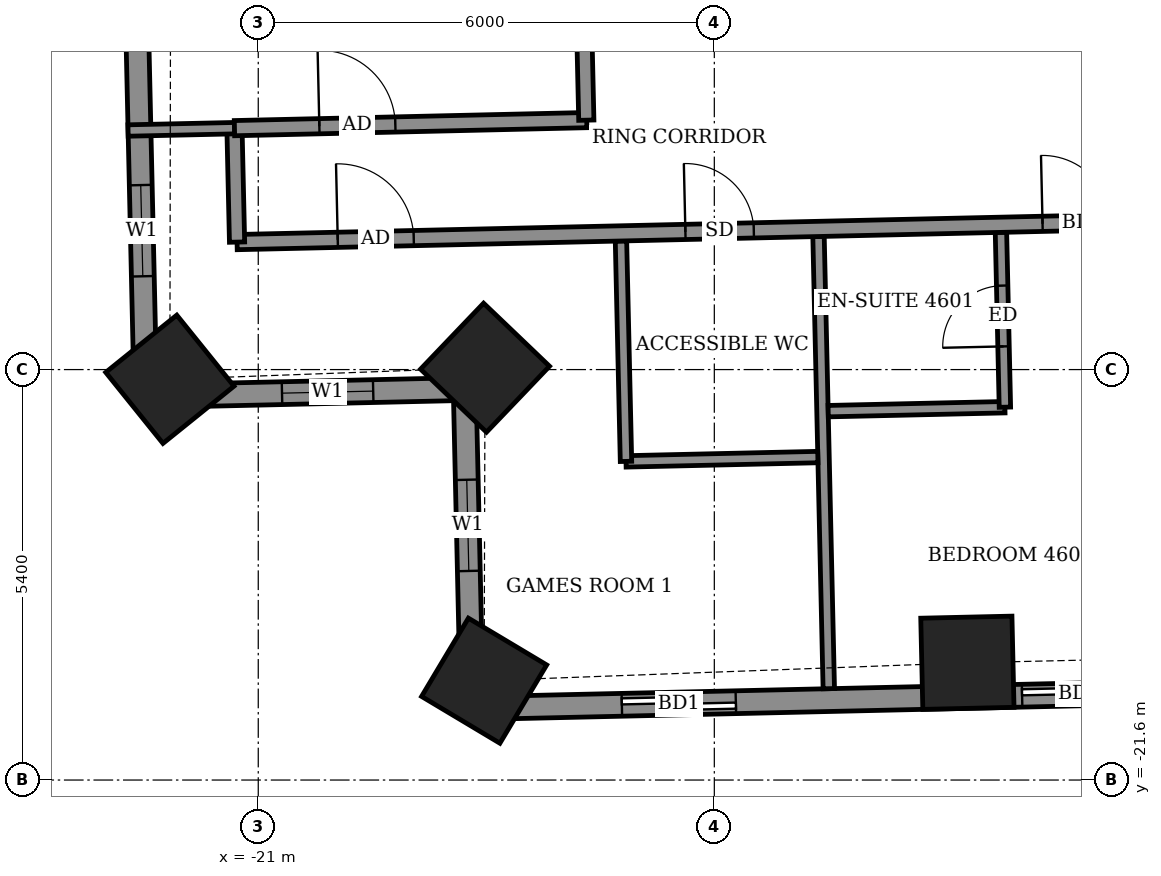
"""IFC4 building model, lengths in metres.
Left out: names, types, materials, properties, quantities, classifications, styles, units other than length and angle.
Written with IfcOpenShell. Run it as: python <this file> out.ifc"""

import sys

from ifc_helpers import new_model, si_unit, direction, frame, frame_2d, origin, origin_2d, place, context, subcontext, project, spatial, rectangle, extrude, element, fill, save


model = new_model("IFC4")
c1 = context("Model", 3, precision=1e-05, world=origin(), true_north=direction((0.0, 1.0)))
c2 = subcontext(c1, "Body", "Model", "MODEL_VIEW")
j1 = project(units=[si_unit("LENGTHUNIT", "METRE"), si_unit("PLANEANGLEUNIT", "RADIAN")], contexts=[c1])
p1 = place(None, origin())
s1 = spatial("IfcSite", under=j1, at=p1, CompositionType="ELEMENT")
p2 = place(p1, origin())
s2 = spatial("IfcBuilding", under=s1, at=p2, CompositionType="ELEMENT")
p3 = place(p2, frame((0.0, 0.0, 182.5)))
s3 = spatial("IfcBuildingStorey", under=s2, at=p3, CompositionType="ELEMENT", Elevation=182.5)
for number, where, z_axis, x_axis in (
    (1, (-22.163, -16.328, -0.55), (0.0, 0.0, 1.0), (0.627, -0.779, 0.0)),
    (2, (-18.016, -16.175, -0.55), (0.0, 0.0, 1.0), (0.723, -0.691, 0.0)),
    (3, (-18.028, -20.293, -0.55), (0.0, 0.0, 1.0), (0.858, -0.513, 0.0)),
    (4, (-11.671, -20.057, -0.55), (0.0, 0.0, 1.0), (1.0, 0.023, 0.0)),
):
    element("IfcColumn", number, at=place(p3, frame(where, z_axis=z_axis, x_axis=x_axis)), inside=s3, PredefinedType="COLUMN", context=c2, shape_type="SweptSolid", body=[
        extrude(rectangle(XDim=1.2, YDim=1.2, at=origin_2d()), origin(), (0.0, 0.0, 1.0), 3.6),
    ])
p4 = place(p3, frame((-22.729, -5.725, 0.0), z_axis=(0.0, 0.0, 1.0), x_axis=(0.022726014582, -0.999741730779, 0.0)))
e5 = element("IfcWall", 5, at=p4, inside=s3, PredefinedType="SOLIDWALL", context=c2, shape_type="SweptSolid", body=[
    extrude(rectangle(XDim=10.829, YDim=0.3, at=frame_2d((5.414, 0.0))), origin(), (0.0, 0.0, 1.0), 3.05),
])
p5 = place(p4, frame((1.142, 0.0, 0.0)))
e6 = element("IfcOpeningElement", 6, at=p5, cuts=e5, PredefinedType="OPENING", context=c2, shape_type="SweptSolid", body=[
    extrude(rectangle(XDim=1.5, YDim=2.4, at=frame_2d((0.75, 1.2))), frame((0.0, 0.16, 0.0), z_axis=(0.0, -1.0, 0.0), x_axis=(1.0, 0.0, 0.0)), (0.0, 0.0, 1.0), 0.32),
])
p6 = place(p4, frame((3.798, 0.0, 0.9)))
e7 = element("IfcOpeningElement", 7, at=p6, cuts=e5, PredefinedType="OPENING", context=c2, shape_type="SweptSolid", body=[
    extrude(rectangle(XDim=0.9, YDim=1.5, at=frame_2d((0.45, 0.75))), frame((0.0, 0.16, 0.0), z_axis=(0.0, -1.0, 0.0), x_axis=(1.0, 0.0, 0.0)), (0.0, 0.0, 1.0), 0.32),
])
p7 = place(p4, frame((8.05, 0.0, 0.9)))
e8 = element("IfcOpeningElement", 8, at=p7, cuts=e5, PredefinedType="OPENING", context=c2, shape_type="SweptSolid", body=[
    extrude(rectangle(XDim=1.2, YDim=1.5, at=frame_2d((0.6, 0.75))), frame((0.0, 0.16, 0.0), z_axis=(0.0, -1.0, 0.0), x_axis=(1.0, 0.0, 0.0)), (0.0, 0.0, 1.0), 0.32),
])
p8 = place(p3, frame((-22.483, -16.551, 0.0), z_axis=(0.0, 0.0, 1.0), x_axis=(0.999744320311, 0.022611811187, 0.0)))
e9 = element("IfcWall", 9, at=p8, inside=s3, PredefinedType="SOLIDWALL", context=c2, shape_type="SweptSolid", body=[
    extrude(rectangle(XDim=4.2, YDim=0.3, at=frame_2d((2.1, 0.0))), origin(), (0.0, 0.0, 1.0), 2.55),
])
p9 = place(p8, frame((1.796, 0.0, 0.9)))
e10 = element("IfcOpeningElement", 10, at=p9, cuts=e9, PredefinedType="OPENING", context=c2, shape_type="SweptSolid", body=[
    extrude(rectangle(XDim=1.2, YDim=1.5, at=frame_2d((0.6, 0.75))), frame((0.0, 0.16, 0.0), z_axis=(0.0, -1.0, 0.0), x_axis=(1.0, 0.0, 0.0)), (0.0, 0.0, 1.0), 0.32),
])
p10 = place(p3, frame((-18.284, -16.456, 0.0), z_axis=(0.0, 0.0, 1.0), x_axis=(0.022611811187, -0.999744320311, 0.0)))
e11 = element("IfcWall", 11, at=p10, inside=s3, PredefinedType="SOLIDWALL", context=c2, shape_type="SweptSolid", body=[
    extrude(rectangle(XDim=4.2, YDim=0.3, at=frame_2d((2.1, 0.0))), origin(), (0.0, 0.0, 1.0), 2.55),
])
p11 = place(p10, frame((1.194, 0.0, 0.9)))
e12 = element("IfcOpeningElement", 12, at=p11, cuts=e11, PredefinedType="OPENING", context=c2, shape_type="SweptSolid", body=[
    extrude(rectangle(XDim=1.2, YDim=1.5, at=frame_2d((0.6, 0.75))), frame((0.0, 0.16, 0.0), z_axis=(0.0, -1.0, 0.0), x_axis=(1.0, 0.0, 0.0)), (0.0, 0.0, 1.0), 0.32),
])
p12 = place(p3, frame((-18.189, -20.655, 0.0), z_axis=(0.0, 0.0, 1.0), x_axis=(0.999742285265, 0.022701609063, 0.0)))
e13 = element("IfcWall", 13, at=p12, inside=s3, PredefinedType="SOLIDWALL", context=c2, shape_type="SweptSolid", body=[
    extrude(rectangle(XDim=39.78, YDim=0.3, at=frame_2d((19.89, 0.0))), origin(), (0.0, 0.0, 1.0), 3.05),
])
p13 = place(p12, frame((1.973, 0.0, 0.0)))
e14 = element("IfcOpeningElement", 14, at=p13, cuts=e13, PredefinedType="OPENING", context=c2, shape_type="SweptSolid", body=[
    extrude(rectangle(XDim=1.5, YDim=2.4, at=frame_2d((0.75, 1.2))), frame((0.0, 0.16, 0.0), z_axis=(0.0, -1.0, 0.0), x_axis=(1.0, 0.0, 0.0)), (0.0, 0.0, 1.0), 0.32),
])
p14 = place(p12, frame((7.24, 0.0, 0.0)))
e15 = element("IfcOpeningElement", 15, at=p14, cuts=e13, PredefinedType="OPENING", context=c2, shape_type="SweptSolid", body=[
    extrude(rectangle(XDim=1.5, YDim=2.4, at=frame_2d((0.75, 1.2))), frame((0.0, 0.16, 0.0), z_axis=(0.0, -1.0, 0.0), x_axis=(1.0, 0.0, 0.0)), (0.0, 0.0, 1.0), 0.32),
])
p15 = place(p12, frame((10.23, 0.0, 0.0)))
e16 = element("IfcOpeningElement", 16, at=p15, cuts=e13, PredefinedType="OPENING", context=c2, shape_type="SweptSolid", body=[
    extrude(rectangle(XDim=1.5, YDim=2.4, at=frame_2d((0.75, 1.2))), frame((0.0, 0.16, 0.0), z_axis=(0.0, -1.0, 0.0), x_axis=(1.0, 0.0, 0.0)), (0.0, 0.0, 1.0), 0.32),
])
p16 = place(p12, frame((14.83, 0.0, 0.0)))
e17 = element("IfcOpeningElement", 17, at=p16, cuts=e13, PredefinedType="OPENING", context=c2, shape_type="SweptSolid", body=[
    extrude(rectangle(XDim=1.5, YDim=2.4, at=frame_2d((0.75, 1.2))), frame((0.0, 0.16, 0.0), z_axis=(0.0, -1.0, 0.0), x_axis=(1.0, 0.0, 0.0)), (0.0, 0.0, 1.0), 0.32),
])
p17 = place(p12, frame((17.97, 0.0, 0.0)))
e18 = element("IfcOpeningElement", 18, at=p17, cuts=e13, PredefinedType="OPENING", context=c2, shape_type="SweptSolid", body=[
    extrude(rectangle(XDim=1.2, YDim=2.4, at=frame_2d((0.6, 1.2))), frame((0.0, 0.16, 0.0), z_axis=(0.0, -1.0, 0.0), x_axis=(1.0, 0.0, 0.0)), (0.0, 0.0, 1.0), 0.32),
])
p18 = place(p12, frame((23.275, 0.0, 0.0)))
e19 = element("IfcOpeningElement", 19, at=p18, cuts=e13, PredefinedType="OPENING", context=c2, shape_type="SweptSolid", body=[
    extrude(rectangle(XDim=1.5, YDim=2.4, at=frame_2d((0.75, 1.2))), frame((0.0, 0.16, 0.0), z_axis=(0.0, -1.0, 0.0), x_axis=(1.0, 0.0, 0.0)), (0.0, 0.0, 1.0), 0.32),
])
p19 = place(p12, frame((27.935, 0.0, 0.0)))
e20 = element("IfcOpeningElement", 20, at=p19, cuts=e13, PredefinedType="OPENING", context=c2, shape_type="SweptSolid", body=[
    extrude(rectangle(XDim=1.5, YDim=2.4, at=frame_2d((0.75, 1.2))), frame((0.0, 0.16, 0.0), z_axis=(0.0, -1.0, 0.0), x_axis=(1.0, 0.0, 0.0)), (0.0, 0.0, 1.0), 0.32),
])
p20 = place(p12, frame((30.925, 0.0, 0.0)))
e21 = element("IfcOpeningElement", 21, at=p20, cuts=e13, PredefinedType="OPENING", context=c2, shape_type="SweptSolid", body=[
    extrude(rectangle(XDim=1.5, YDim=2.4, at=frame_2d((0.75, 1.2))), frame((0.0, 0.16, 0.0), z_axis=(0.0, -1.0, 0.0), x_axis=(1.0, 0.0, 0.0)), (0.0, 0.0, 1.0), 0.32),
])
p21 = place(p12, frame((35.665, 0.0, 0.9)))
e22 = element("IfcOpeningElement", 22, at=p21, cuts=e13, PredefinedType="OPENING", context=c2, shape_type="SweptSolid", body=[
    extrude(rectangle(XDim=2.4, YDim=1.5, at=frame_2d((1.2, 0.75))), frame((0.0, 0.16, 0.0), z_axis=(0.0, -1.0, 0.0), x_axis=(1.0, 0.0, 0.0)), (0.0, 0.0, 1.0), 0.32),
])
p22 = place(p3, frame((-13.494, -20.398, 0.0), z_axis=(0.0, 0.0, 1.0), x_axis=(-0.022692509051, 0.999742491861, 0.0)))
e23 = element("IfcWall", 23, at=p22, inside=s3, PredefinedType="PARTITIONING", context=c2, shape_type="SweptSolid", body=[
    extrude(rectangle(XDim=5.949, YDim=0.15, at=frame_2d((2.975, 0.0))), origin(), (0.0, 0.0, 1.0), 2.55),
])
p23 = place(p3, frame((-16.162, -17.408, 0.0), z_axis=(0.0, 0.0, 1.0), x_axis=(0.999746160391, 0.022530308093, 0.0)))
e24 = element("IfcWall", 24, at=p23, inside=s3, PredefinedType="PARTITIONING", context=c2, shape_type="SweptSolid", body=[
    extrude(rectangle(XDim=2.525, YDim=0.15, at=frame_2d((1.262, 0.0))), origin(), (0.0, 0.0, 1.0), 3.05),
])
p24 = place(p3, frame((-16.162, -17.408, 0.0), z_axis=(0.0, 0.0, 1.0), x_axis=(-0.022732880677, 0.999741574676, 0.0)))
e25 = element("IfcWall", 25, at=p24, inside=s3, PredefinedType="PARTITIONING", context=c2, shape_type="SweptSolid", body=[
    extrude(rectangle(XDim=2.9, YDim=0.15, at=frame_2d((1.45, 0.0))), origin(), (0.0, 0.0, 1.0), 3.05),
])
p25 = place(p3, frame((-13.502, -16.747, 0.0), z_axis=(0.0, 0.0, 1.0), x_axis=(0.999749954681, 0.022361308448, 0.0)))
e26 = element("IfcWall", 26, at=p25, inside=s3, PredefinedType="PARTITIONING", context=c2, shape_type="SweptSolid", body=[
    extrude(rectangle(XDim=2.325, YDim=0.15, at=frame_2d((1.163, 0.0))), origin(), (0.0, 0.0, 1.0), 3.05),
])
p26 = place(p3, frame((-11.177, -16.695, 0.0), z_axis=(0.0, 0.0, 1.0), x_axis=(-0.022603288534, 0.999744513037, 0.0)))
e27 = element("IfcWall", 27, at=p26, inside=s3, PredefinedType="PARTITIONING", context=c2, shape_type="SweptSolid", body=[
    extrude(rectangle(XDim=2.301, YDim=0.15, at=frame_2d((1.15, 0.0))), origin(), (0.0, 0.0, 1.0), 3.05),
])
p27 = place(p26, frame((0.8, 0.0, 0.0)))
e28 = element("IfcOpeningElement", 28, at=p27, cuts=e27, PredefinedType="OPENING", context=c2, shape_type="SweptSolid", body=[
    extrude(rectangle(XDim=0.8, YDim=2.1, at=frame_2d((0.4, 1.05))), frame((0.0, 0.085, 0.0), z_axis=(0.0, -1.0, 0.0), x_axis=(1.0, 0.0, 0.0)), (0.0, 0.0, 1.0), 0.17),
])
p28 = place(p3, frame((-21.279, -14.523, 0.0), z_axis=(0.0, 0.0, 1.0), x_axis=(0.999742878501, 0.022675468818, 0.0)))
e29 = element("IfcWall", 29, at=p28, inside=s3, PredefinedType="PARTITIONING", context=c2, shape_type="SweptSolid", body=[
    extrude(rectangle(XDim=46.48, YDim=0.2, at=frame_2d((23.24, 0.0))), origin(), (0.0, 0.0, 1.0), 3.05),
])
p29 = place(p28, frame((1.325, 0.0, 0.0)))
e30 = element("IfcOpeningElement", 30, at=p29, cuts=e29, PredefinedType="OPENING", context=c2, shape_type="SweptSolid", body=[
    extrude(rectangle(XDim=1.0, YDim=2.1, at=frame_2d((0.5, 1.05))), frame((0.0, 0.11, 0.0), z_axis=(0.0, -1.0, 0.0), x_axis=(1.0, 0.0, 0.0)), (0.0, 0.0, 1.0), 0.22),
])
p30 = place(p28, frame((5.9, 0.0, 0.0)))
e31 = element("IfcOpeningElement", 31, at=p30, cuts=e29, PredefinedType="OPENING", context=c2, shape_type="SweptSolid", body=[
    extrude(rectangle(XDim=0.9, YDim=2.1, at=frame_2d((0.45, 1.05))), frame((0.0, 0.11, 0.0), z_axis=(0.0, -1.0, 0.0), x_axis=(1.0, 0.0, 0.0)), (0.0, 0.0, 1.0), 0.22),
])
p31 = place(p28, frame((10.6, 0.0, 0.0)))
e32 = element("IfcOpeningElement", 32, at=p31, cuts=e29, PredefinedType="OPENING", context=c2, shape_type="SweptSolid", body=[
    extrude(rectangle(XDim=0.9, YDim=2.1, at=frame_2d((0.45, 1.05))), frame((0.0, 0.11, 0.0), z_axis=(0.0, -1.0, 0.0), x_axis=(1.0, 0.0, 0.0)), (0.0, 0.0, 1.0), 0.22),
])
p32 = place(p28, frame((12.525, 0.0, 0.0)))
e33 = element("IfcOpeningElement", 33, at=p32, cuts=e29, PredefinedType="OPENING", context=c2, shape_type="SweptSolid", body=[
    extrude(rectangle(XDim=0.9, YDim=2.1, at=frame_2d((0.45, 1.05))), frame((0.0, 0.11, 0.0), z_axis=(0.0, -1.0, 0.0), x_axis=(1.0, 0.0, 0.0)), (0.0, 0.0, 1.0), 0.22),
])
p33 = place(p28, frame((19.175, 0.0, 0.0)))
e34 = element("IfcOpeningElement", 34, at=p33, cuts=e29, PredefinedType="OPENING", context=c2, shape_type="SweptSolid", body=[
    extrude(rectangle(XDim=0.9, YDim=2.1, at=frame_2d((0.45, 1.05))), frame((0.0, 0.11, 0.0), z_axis=(0.0, -1.0, 0.0), x_axis=(1.0, 0.0, 0.0)), (0.0, 0.0, 1.0), 0.22),
])
p34 = place(p28, frame((21.05, 0.0, 0.0)))
e35 = element("IfcOpeningElement", 35, at=p34, cuts=e29, PredefinedType="OPENING", context=c2, shape_type="SweptSolid", body=[
    extrude(rectangle(XDim=0.9, YDim=2.1, at=frame_2d((0.45, 1.05))), frame((0.0, 0.11, 0.0), z_axis=(0.0, -1.0, 0.0), x_axis=(1.0, 0.0, 0.0)), (0.0, 0.0, 1.0), 0.22),
])
p35 = place(p28, frame((27.725, 0.0, 0.0)))
e36 = element("IfcOpeningElement", 36, at=p35, cuts=e29, PredefinedType="OPENING", context=c2, shape_type="SweptSolid", body=[
    extrude(rectangle(XDim=0.9, YDim=2.1, at=frame_2d((0.45, 1.05))), frame((0.0, 0.11, 0.0), z_axis=(0.0, -1.0, 0.0), x_axis=(1.0, 0.0, 0.0)), (0.0, 0.0, 1.0), 0.22),
])
p36 = place(p28, frame((29.6, 0.0, 0.0)))
e37 = element("IfcOpeningElement", 37, at=p36, cuts=e29, PredefinedType="OPENING", context=c2, shape_type="SweptSolid", body=[
    extrude(rectangle(XDim=0.9, YDim=2.1, at=frame_2d((0.45, 1.05))), frame((0.0, 0.11, 0.0), z_axis=(0.0, -1.0, 0.0), x_axis=(1.0, 0.0, 0.0)), (0.0, 0.0, 1.0), 0.22),
])
p37 = place(p28, frame((36.325, 0.0, 0.0)))
e38 = element("IfcOpeningElement", 38, at=p37, cuts=e29, PredefinedType="OPENING", context=c2, shape_type="SweptSolid", body=[
    extrude(rectangle(XDim=0.9, YDim=2.1, at=frame_2d((0.45, 1.05))), frame((0.0, 0.11, 0.0), z_axis=(0.0, -1.0, 0.0), x_axis=(1.0, 0.0, 0.0)), (0.0, 0.0, 1.0), 0.22),
])
p38 = place(p28, frame((43.915, 0.0, 0.0)))
e39 = element("IfcOpeningElement", 39, at=p38, cuts=e29, PredefinedType="OPENING", context=c2, shape_type="SweptSolid", body=[
    extrude(rectangle(XDim=1.0, YDim=2.1, at=frame_2d((0.5, 1.05))), frame((0.0, 0.11, 0.0), z_axis=(0.0, -1.0, 0.0), x_axis=(1.0, 0.0, 0.0)), (0.0, 0.0, 1.0), 0.22),
])
p39 = place(p28, frame((38.6, 0.0, 0.0)))
e40 = element("IfcOpeningElement", 40, at=p39, cuts=e29, PredefinedType="OPENING", context=c2, shape_type="SweptSolid", body=[
    extrude(rectangle(XDim=0.9, YDim=2.1, at=frame_2d((0.45, 1.05))), frame((0.0, 0.11, 0.0), z_axis=(0.0, -1.0, 0.0), x_axis=(1.0, 0.0, 0.0)), (0.0, 0.0, 1.0), 0.22),
])
p40 = place(p3, frame((-21.279, -14.523, 0.0), z_axis=(0.0, 0.0, 1.0), x_axis=(-0.022632637625, 0.99974384905, 0.0)))
e41 = element("IfcWall", 41, at=p40, inside=s3, PredefinedType="PARTITIONING", context=c2, shape_type="SweptSolid", body=[
    extrude(rectangle(XDim=1.5, YDim=0.2, at=frame_2d((0.75, 0.0))), origin(), (0.0, 0.0, 1.0), 3.05),
])
p41 = place(p3, frame((-22.713, -13.055, 0.0), z_axis=(0.0, 0.0, 1.0), x_axis=(0.999756172383, 0.022081571112, 0.0)))
e42 = element("IfcWall", 42, at=p41, inside=s3, PredefinedType="PARTITIONING", context=c2, shape_type="SweptSolid", body=[
    extrude(rectangle(XDim=1.404, YDim=0.15, at=frame_2d((0.702, 0.0))), origin(), (0.0, 0.0, 1.0), 2.55),
])
p42 = place(p3, frame((-21.313, -13.024, 0.0), z_axis=(0.0, 0.0, 1.0), x_axis=(0.999738699021, 0.022858995594, 0.0)))
e43 = element("IfcWall", 43, at=p42, inside=s3, PredefinedType="PARTITIONING", context=c2, shape_type="SweptSolid", body=[
    extrude(rectangle(XDim=4.635, YDim=0.2, at=frame_2d((2.318, 0.0))), origin(), (0.0, 0.0, 1.0), 3.05),
])
p43 = place(p42, frame((1.117, 0.0, 0.0)))
e44 = element("IfcOpeningElement", 44, at=p43, cuts=e43, PredefinedType="OPENING", context=c2, shape_type="SweptSolid", body=[
    extrude(rectangle(XDim=1.0, YDim=2.1, at=frame_2d((0.5, 1.05))), frame((0.0, 0.11, 0.0), z_axis=(0.0, -1.0, 0.0), x_axis=(1.0, 0.0, 0.0)), (0.0, 0.0, 1.0), 0.22),
])
p44 = place(p3, frame((-16.684, -12.919, 0.0), z_axis=(0.0, 0.0, 1.0), x_axis=(-0.022694293906, 0.999742451346, 0.0)))
e45 = element("IfcWall", 45, at=p44, inside=s3, PredefinedType="PARTITIONING", context=c2, shape_type="SweptSolid", body=[
    extrude(rectangle(XDim=28.024, YDim=0.2, at=frame_2d((14.012, 0.0))), origin(), (0.0, 0.0, 1.0), 3.05),
])
p45 = place(p44, frame((22.625, 0.0, 0.0)))
e46 = element("IfcOpeningElement", 46, at=p45, cuts=e45, PredefinedType="OPENING", context=c2, shape_type="SweptSolid", body=[
    extrude(rectangle(XDim=1.0, YDim=2.1, at=frame_2d((0.5, 1.05))), frame((0.0, 0.11, 0.0), z_axis=(0.0, -1.0, 0.0), x_axis=(1.0, 0.0, 0.0)), (0.0, 0.0, 1.0), 0.22),
])
p46 = place(p44, frame((26.174, 0.0, 0.0)))
e47 = element("IfcOpeningElement", 47, at=p46, cuts=e45, PredefinedType="OPENING", context=c2, shape_type="SweptSolid", body=[
    extrude(rectangle(XDim=0.9, YDim=2.1, at=frame_2d((0.45, 1.05))), frame((0.0, 0.11, 0.0), z_axis=(0.0, -1.0, 0.0), x_axis=(1.0, 0.0, 0.0)), (0.0, 0.0, 1.0), 0.22),
])
p47 = place(p44, frame((16.432, 0.0, 0.0)))
e48 = element("IfcOpeningElement", 48, at=p47, cuts=e45, PredefinedType="OPENING", context=c2, shape_type="SweptSolid", body=[
    extrude(rectangle(XDim=1.0, YDim=2.1, at=frame_2d((0.5, 1.05))), frame((0.0, 0.11, 0.0), z_axis=(0.0, -1.0, 0.0), x_axis=(1.0, 0.0, 0.0)), (0.0, 0.0, 1.0), 0.22),
])
p48 = place(p44, frame((10.975, 0.0, 0.0)))
e49 = element("IfcOpeningElement", 49, at=p48, cuts=e45, PredefinedType="OPENING", context=c2, shape_type="SweptSolid", body=[
    extrude(rectangle(XDim=1.0, YDim=2.1, at=frame_2d((0.5, 1.05))), frame((0.0, 0.11, 0.0), z_axis=(0.0, -1.0, 0.0), x_axis=(1.0, 0.0, 0.0)), (0.0, 0.0, 1.0), 0.22),
])
p49 = place(p44, frame((8.025, 0.0, 0.0)))
e50 = element("IfcOpeningElement", 50, at=p49, cuts=e45, PredefinedType="OPENING", context=c2, shape_type="SweptSolid", body=[
    extrude(rectangle(XDim=0.9, YDim=2.1, at=frame_2d((0.45, 1.05))), frame((0.0, 0.11, 0.0), z_axis=(0.0, -1.0, 0.0), x_axis=(1.0, 0.0, 0.0)), (0.0, 0.0, 1.0), 0.22),
])
p50 = place(p44, frame((5.113, 0.0, 0.0)))
e51 = element("IfcOpeningElement", 51, at=p50, cuts=e45, PredefinedType="OPENING", context=c2, shape_type="SweptSolid", body=[
    extrude(rectangle(XDim=1.0, YDim=2.1, at=frame_2d((0.5, 1.05))), frame((0.0, 0.11, 0.0), z_axis=(0.0, -1.0, 0.0), x_axis=(1.0, 0.0, 0.0)), (0.0, 0.0, 1.0), 0.22),
])
p51 = place(p7, origin())
e52 = element("IfcWindow", 52, at=p51, inside=s3, PartitioningType="SINGLE_PANEL", PredefinedType="WINDOW", context=c2, shape_type="SweptSolid", body=[
    extrude(rectangle(XDim=1.2, YDim=1.5, at=frame_2d((0.6, 0.75))), frame((0.0, 0.03, 0.0), z_axis=(0.0, -1.0, 0.0), x_axis=(1.0, 0.0, 0.0)), (0.0, 0.0, 1.0), 0.06),
])
fill(e8, e52)
p52 = place(p9, origin())
e53 = element("IfcWindow", 53, at=p52, inside=s3, PartitioningType="SINGLE_PANEL", PredefinedType="WINDOW", context=c2, shape_type="SweptSolid", body=[
    extrude(rectangle(XDim=1.2, YDim=1.5, at=frame_2d((0.6, 0.75))), frame((0.0, 0.03, 0.0), z_axis=(0.0, -1.0, 0.0), x_axis=(1.0, 0.0, 0.0)), (0.0, 0.0, 1.0), 0.06),
])
fill(e10, e53)
p53 = place(p11, origin())
e54 = element("IfcWindow", 54, at=p53, inside=s3, PartitioningType="SINGLE_PANEL", PredefinedType="WINDOW", context=c2, shape_type="SweptSolid", body=[
    extrude(rectangle(XDim=1.2, YDim=1.5, at=frame_2d((0.6, 0.75))), frame((0.0, 0.03, 0.0), z_axis=(0.0, -1.0, 0.0), x_axis=(1.0, 0.0, 0.0)), (0.0, 0.0, 1.0), 0.06),
])
fill(e12, e54)
p54 = place(p13, origin())
e55 = element("IfcDoor", 55, at=p54, inside=s3, OperationType="SLIDING_TO_LEFT", PredefinedType="DOOR", context=c2, shape_type="SweptSolid", body=[
    extrude(rectangle(XDim=1.5, YDim=2.4, at=frame_2d((0.75, 1.2))), frame((0.0, 0.025, 0.0), z_axis=(0.0, -1.0, 0.0), x_axis=(1.0, 0.0, 0.0)), (0.0, 0.0, 1.0), 0.05),
])
fill(e14, e55)
p55 = place(p14, origin())
e56 = element("IfcDoor", 56, at=p55, inside=s3, OperationType="SLIDING_TO_LEFT", PredefinedType="DOOR", context=c2, shape_type="SweptSolid", body=[
    extrude(rectangle(XDim=1.5, YDim=2.4, at=frame_2d((0.75, 1.2))), frame((0.0, 0.025, 0.0), z_axis=(0.0, -1.0, 0.0), x_axis=(1.0, 0.0, 0.0)), (0.0, 0.0, 1.0), 0.05),
])
fill(e15, e56)
p56 = place(p29, origin())
e57 = element("IfcDoor", 57, at=p56, inside=s3, OperationType="SINGLE_SWING_LEFT", PredefinedType="DOOR", context=c2, shape_type="SweptSolid", body=[
    extrude(rectangle(XDim=1.0, YDim=2.1, at=frame_2d((0.5, 1.05))), frame((0.0, 0.025, 0.0), z_axis=(0.0, -1.0, 0.0), x_axis=(1.0, 0.0, 0.0)), (0.0, 0.0, 1.0), 0.05),
])
fill(e30, e57)
p57 = place(p30, origin())
e58 = element("IfcDoor", 58, at=p57, inside=s3, OperationType="SINGLE_SWING_LEFT", PredefinedType="DOOR", context=c2, shape_type="SweptSolid", body=[
    extrude(rectangle(XDim=0.9, YDim=2.1, at=frame_2d((0.45, 1.05))), frame((0.0, 0.025, 0.0), z_axis=(0.0, -1.0, 0.0), x_axis=(1.0, 0.0, 0.0)), (0.0, 0.0, 1.0), 0.05),
])
fill(e31, e58)
p58 = place(p31, origin())
e59 = element("IfcDoor", 59, at=p58, inside=s3, OperationType="SINGLE_SWING_LEFT", PredefinedType="DOOR", context=c2, shape_type="SweptSolid", body=[
    extrude(rectangle(XDim=0.9, YDim=2.1, at=frame_2d((0.45, 1.05))), frame((0.0, 0.025, 0.0), z_axis=(0.0, -1.0, 0.0), x_axis=(1.0, 0.0, 0.0)), (0.0, 0.0, 1.0), 0.05),
])
fill(e32, e59)
p59 = place(p27, origin())
e60 = element("IfcDoor", 60, at=p59, inside=s3, OperationType="SINGLE_SWING_LEFT", PredefinedType="DOOR", context=c2, shape_type="SweptSolid", body=[
    extrude(rectangle(XDim=0.8, YDim=2.1, at=frame_2d((0.4, 1.05))), frame((0.0, 0.025, 0.0), z_axis=(0.0, -1.0, 0.0), x_axis=(1.0, 0.0, 0.0)), (0.0, 0.0, 1.0), 0.05),
])
fill(e28, e60)
p60 = place(p43, origin())
e61 = element("IfcDoor", 61, at=p60, inside=s3, OperationType="SINGLE_SWING_LEFT", PredefinedType="DOOR", context=c2, shape_type="SweptSolid", body=[
    extrude(rectangle(XDim=1.0, YDim=2.1, at=frame_2d((0.5, 1.05))), frame((0.0, 0.025, 0.0), z_axis=(0.0, -1.0, 0.0), x_axis=(1.0, 0.0, 0.0)), (0.0, 0.0, 1.0), 0.05),
])
fill(e44, e61)
save(model, sys.argv[1])
